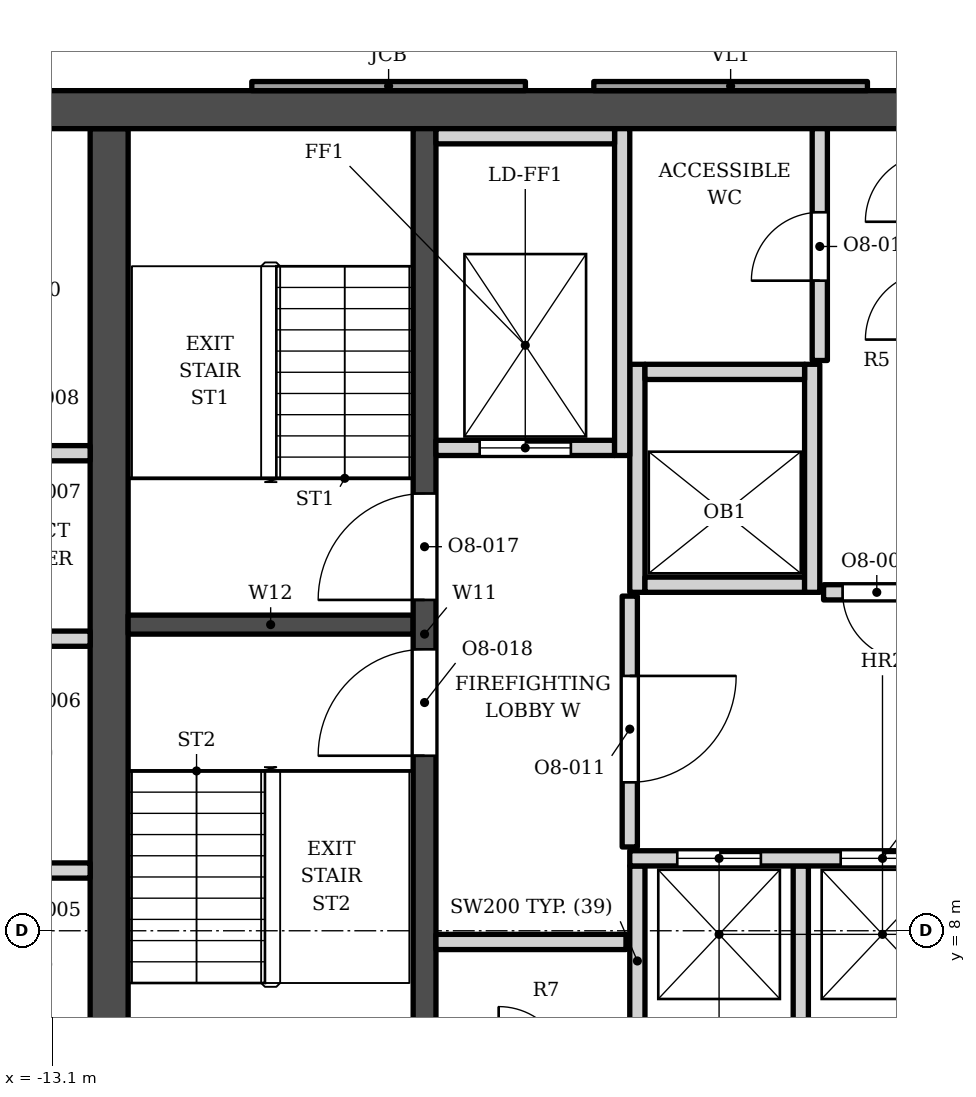
"""IFC4 building model, lengths in metres.
Left out: names, types, materials, properties, quantities, classifications, styles, units other than length and angle.
Written with IfcOpenShell. Run it as: python <this file> out.ifc"""

import sys

from ifc_helpers import new_model, si_unit, direction, frame, frame_2d, origin, place, context, subcontext, project, spatial, polyline, rectangle, outline, extrude, element, fill, save


model = new_model("IFC4")
c1 = context("Model", 3, precision=1e-05, world=origin(), true_north=direction((0.0, 1.0)))
c2 = subcontext(c1, "Body", "Model", "MODEL_VIEW")
j1 = project(units=[si_unit("LENGTHUNIT", "METRE"), si_unit("PLANEANGLEUNIT", "RADIAN")], contexts=[c1])
p1 = place(None, origin())
s1 = spatial("IfcSite", under=j1, at=p1, CompositionType="ELEMENT")
p2 = place(p1, origin())
s2 = spatial("IfcBuilding", under=s1, at=p2, CompositionType="ELEMENT")
p3 = place(p2, frame((0.0, 0.0, 231.5)))
s3 = spatial("IfcBuildingStorey", under=s2, at=p3, CompositionType="ELEMENT", Elevation=231.5)
p4 = place(p3, frame((-13.9, 18.802, 0.0), z_axis=(0.0, 0.0, 1.0), x_axis=(1.0, 0.0, 0.0)))
e1 = element("IfcWall", 1, at=p4, inside=s3, PredefinedType="SHEAR", context=c2, shape_type="SweptSolid", body=[
    extrude(rectangle(XDim=27.8, YDim=0.5, at=frame_2d((13.9, 0.0))), origin(), (0.0, 0.0, 1.0), 3.9),
])
p5 = place(p3, frame((-12.35, 5.253, 0.0), z_axis=(0.0, 0.0, 1.0), x_axis=(0.0, 1.0, 0.0)))
e2 = element("IfcWall", 2, at=p5, inside=s3, PredefinedType="SHEAR", context=c2, shape_type="SweptSolid", body=[
    extrude(rectangle(XDim=13.3, YDim=0.5, at=frame_2d((6.65, 0.0))), origin(), (0.0, 0.0, 1.0), 3.9),
])
p6 = place(p3, frame((-8.2, 5.253, 0.0), z_axis=(0.0, 0.0, 1.0), x_axis=(0.0, 1.0, 0.0)))
e3 = element("IfcWall", 3, at=p6, inside=s3, PredefinedType="SHEAR", context=c2, shape_type="SweptSolid", body=[
    extrude(rectangle(XDim=13.3, YDim=0.3, at=frame_2d((6.65, 0.0))), origin(), (0.0, 0.0, 1.0), 3.9),
])
p7 = place(p6, frame((7.1, 0.0, 0.0)))
e4 = element("IfcOpeningElement", 4, at=p7, cuts=e3, PredefinedType="OPENING", context=c2, shape_type="SweptSolid", body=[
    extrude(rectangle(XDim=1.4, YDim=2.1, at=frame_2d((0.7, 1.05))), frame((0.0, 0.16, 0.0), z_axis=(0.0, -1.0, 0.0), x_axis=(1.0, 0.0, 0.0)), (0.0, 0.0, 1.0), 0.32),
])
p8 = place(p6, frame((5.05, 0.0, 0.0)))
e5 = element("IfcOpeningElement", 5, at=p8, cuts=e3, PredefinedType="OPENING", context=c2, shape_type="SweptSolid", body=[
    extrude(rectangle(XDim=1.4, YDim=2.1, at=frame_2d((0.7, 1.05))), frame((0.0, 0.16, 0.0), z_axis=(0.0, -1.0, 0.0), x_axis=(1.0, 0.0, 0.0)), (0.0, 0.0, 1.0), 0.32),
])
p9 = place(p3, frame((-12.1, 12.028, 0.0), z_axis=(0.0, 0.0, 1.0), x_axis=(1.0, 0.0, 0.0)))
e6 = element("IfcWall", 6, at=p9, inside=s3, PredefinedType="SHEAR", context=c2, shape_type="SweptSolid", body=[
    extrude(rectangle(XDim=3.75, YDim=0.25, at=frame_2d((1.875, 0.0))), origin(), (0.0, 0.0, 1.0), 3.9),
])
p10 = place(p3, origin())
e7 = element("IfcWall", 7, at=p10, inside=s3, PredefinedType="ELEMENTEDWALL", context=c2, shape_type="SweptSolid", body=[
    extrude(outline(polyline([(-5.973, 19.173), (-5.973, 19.052), (-2.373, 19.052), (-2.373, 19.173), (-5.973, 19.173)])), origin(), (0.0, 0.0, 1.0), 3.0),
])
p11 = place(p3, origin())
e8 = element("IfcWall", 8, at=p11, inside=s3, PredefinedType="SOLIDWALL", context=c2, shape_type="SweptSolid", body=[
    extrude(outline(polyline([(-10.473, 19.173), (-10.473, 19.052), (-6.873, 19.052), (-6.873, 19.173), (-10.473, 19.173)])), origin(), (0.0, 0.0, 1.0), 3.0),
])
for number, where, z_axis, x_axis in (
    (9, (-5.4, 6.353, 0.0), (0.0, 0.0, 1.0), (0.0, 1.0, 0.0)),
    (10, (-3.25, 6.353, 0.0), (0.0, 0.0, 1.0), (0.0, 1.0, 0.0)),
    (11, (-8.05, 7.853, 0.0), (0.0, 0.0, 1.0), (1.0, 0.0, 0.0)),
):
    element("IfcWall", number, at=place(p3, frame(where, z_axis=z_axis, x_axis=x_axis)), inside=s3, PredefinedType="SOLIDWALL", context=c2, shape_type="SweptSolid", body=[
        extrude(rectangle(XDim=2.5, YDim=0.2, at=frame_2d((1.25, 0.0))), origin(), (0.0, 0.0, 1.0), 3.73),
    ])
p12 = place(p3, frame((-13.9, 8.792, 0.0), z_axis=(0.0, 0.0, 1.0), x_axis=(1.0, 0.0, 0.0)))
e12 = element("IfcWall", 12, at=p12, inside=s3, PredefinedType="SOLIDWALL", context=c2, shape_type="SweptSolid", body=[
    extrude(rectangle(XDim=1.3, YDim=0.2, at=frame_2d((0.65, 0.0))), origin(), (0.0, 0.0, 1.0), 3.73),
])
p13 = place(p3, frame((-5.5, 8.953, 0.0), z_axis=(0.0, 0.0, 1.0), x_axis=(1.0, 0.0, 0.0)))
e13 = element("IfcWall", 13, at=p13, inside=s3, PredefinedType="SOLIDWALL", context=c2, shape_type="SweptSolid", body=[
    extrude(rectangle(XDim=4.5, YDim=0.2, at=frame_2d((2.25, 0.0))), origin(), (0.0, 0.0, 1.0), 3.73),
])
p14 = place(p13, frame((0.625, 0.0, 0.0)))
e14 = element("IfcOpeningElement", 14, at=p14, cuts=e13, PredefinedType="OPENING", context=c2, shape_type="SweptSolid", body=[
    extrude(rectangle(XDim=1.1, YDim=2.1, at=frame_2d((0.55, 1.05))), frame((0.0, 0.11, 0.0), z_axis=(0.0, -1.0, 0.0), x_axis=(1.0, 0.0, 0.0)), (0.0, 0.0, 1.0), 0.22),
])
p15 = place(p13, frame((2.775, 0.0, 0.0)))
e15 = element("IfcOpeningElement", 15, at=p15, cuts=e13, PredefinedType="OPENING", context=c2, shape_type="SweptSolid", body=[
    extrude(rectangle(XDim=1.1, YDim=2.1, at=frame_2d((0.55, 1.05))), frame((0.0, 0.11, 0.0), z_axis=(0.0, -1.0, 0.0), x_axis=(1.0, 0.0, 0.0)), (0.0, 0.0, 1.0), 0.22),
])
p16 = place(p3, frame((-5.5, 9.103, 0.0), z_axis=(0.0, 0.0, 1.0), x_axis=(0.0, 1.0, 0.0)))
e16 = element("IfcWall", 16, at=p16, inside=s3, PredefinedType="SOLIDWALL", context=c2, shape_type="SweptSolid", body=[
    extrude(rectangle(XDim=3.3, YDim=0.2, at=frame_2d((1.65, 0.0))), origin(), (0.0, 0.0, 1.0), 3.73),
])
p17 = place(p16, frame((0.85, 0.0, 0.0)))
e17 = element("IfcOpeningElement", 17, at=p17, cuts=e16, PredefinedType="OPENING", context=c2, shape_type="SweptSolid", body=[
    extrude(rectangle(XDim=1.4, YDim=2.1, at=frame_2d((0.7, 1.05))), frame((0.0, 0.11, 0.0), z_axis=(0.0, -1.0, 0.0), x_axis=(1.0, 0.0, 0.0)), (0.0, 0.0, 1.0), 0.22),
])
p18 = place(p3, frame((-13.9, 11.843, 0.0), z_axis=(0.0, 0.0, 1.0), x_axis=(1.0, 0.0, 0.0)))
e18 = element("IfcWall", 18, at=p18, inside=s3, PredefinedType="SOLIDWALL", context=c2, shape_type="SweptSolid", body=[
    extrude(rectangle(XDim=1.3, YDim=0.2, at=frame_2d((0.65, 0.0))), origin(), (0.0, 0.0, 1.0), 3.73),
])
p19 = place(p3, frame((-2.95, 12.453, 0.0), z_axis=(0.0, 0.0, 1.0), x_axis=(1.0, 0.0, 0.0)))
e19 = element("IfcWall", 19, at=p19, inside=s3, PredefinedType="SOLIDWALL", context=c2, shape_type="SweptSolid", body=[
    extrude(rectangle(XDim=1.4, YDim=0.2, at=frame_2d((0.7, 0.0))), origin(), (0.0, 0.0, 1.0), 3.73),
])
p20 = place(p19, frame((0.25, 0.0, 0.0)))
e20 = element("IfcOpeningElement", 20, at=p20, cuts=e19, PredefinedType="OPENING", context=c2, shape_type="SweptSolid", body=[
    extrude(rectangle(XDim=0.9, YDim=2.1, at=frame_2d((0.45, 1.05))), frame((0.0, 0.11, 0.0), z_axis=(0.0, -1.0, 0.0), x_axis=(1.0, 0.0, 0.0)), (0.0, 0.0, 1.0), 0.22),
])
p21 = place(p3, frame((-5.4, 12.453, 0.0), z_axis=(0.0, 0.0, 1.0), x_axis=(0.0, 1.0, 0.0)))
e21 = element("IfcWall", 21, at=p21, inside=s3, PredefinedType="SOLIDWALL", context=c2, shape_type="SweptSolid", body=[
    extrude(rectangle(XDim=3.0, YDim=0.2, at=frame_2d((1.5, 0.0))), origin(), (0.0, 0.0, 1.0), 3.73),
])
p22 = place(p3, frame((-5.3, 12.552, 0.0), z_axis=(0.0, 0.0, 1.0), x_axis=(1.0, 0.0, 0.0)))
e22 = element("IfcWall", 22, at=p22, inside=s3, PredefinedType="SOLIDWALL", context=c2, shape_type="SweptSolid", body=[
    extrude(rectangle(XDim=2.1, YDim=0.2, at=frame_2d((1.05, 0.0))), origin(), (0.0, 0.0, 1.0), 3.73),
])
p23 = place(p3, frame((-3.1, 12.453, 0.0), z_axis=(0.0, 0.0, 1.0), x_axis=(0.0, 1.0, 0.0)))
e23 = element("IfcWall", 23, at=p23, inside=s3, PredefinedType="SOLIDWALL", context=c2, shape_type="SweptSolid", body=[
    extrude(rectangle(XDim=3.0, YDim=0.2, at=frame_2d((1.5, 0.0))), origin(), (0.0, 0.0, 1.0), 3.73),
])
p24 = place(p3, frame((-13.9, 14.283, 0.0), z_axis=(0.0, 0.0, 1.0), x_axis=(1.0, 0.0, 0.0)))
e24 = element("IfcWall", 24, at=p24, inside=s3, PredefinedType="SOLIDWALL", context=c2, shape_type="SweptSolid", body=[
    extrude(rectangle(XDim=1.3, YDim=0.2, at=frame_2d((0.65, 0.0))), origin(), (0.0, 0.0, 1.0), 3.73),
])
p25 = place(p3, frame((-8.05, 14.353, 0.0), z_axis=(0.0, 0.0, 1.0), x_axis=(1.0, 0.0, 0.0)))
e25 = element("IfcWall", 25, at=p25, inside=s3, PredefinedType="SOLIDWALL", context=c2, shape_type="SweptSolid", body=[
    extrude(rectangle(XDim=2.35, YDim=0.2, at=frame_2d((1.175, 0.0))), origin(), (0.0, 0.0, 1.0), 3.73),
])
p26 = place(p25, frame((0.575, 0.0, 0.0)))
e26 = element("IfcOpeningElement", 26, at=p26, cuts=e25, PredefinedType="OPENING", context=c2, shape_type="SweptSolid", body=[
    extrude(rectangle(XDim=1.2, YDim=2.1, at=frame_2d((0.6, 1.05))), frame((0.0, 0.11, 0.0), z_axis=(0.0, -1.0, 0.0), x_axis=(1.0, 0.0, 0.0)), (0.0, 0.0, 1.0), 0.22),
])
p27 = place(p3, frame((-5.6, 14.253, 0.0), z_axis=(0.0, 0.0, 1.0), x_axis=(0.0, 1.0, 0.0)))
e27 = element("IfcWall", 27, at=p27, inside=s3, PredefinedType="SOLIDWALL", context=c2, shape_type="SweptSolid", body=[
    extrude(rectangle(XDim=4.3, YDim=0.2, at=frame_2d((2.15, 0.0))), origin(), (0.0, 0.0, 1.0), 3.73),
])
p28 = place(p3, frame((-5.3, 15.353, 0.0), z_axis=(0.0, 0.0, 1.0), x_axis=(1.0, 0.0, 0.0)))
e28 = element("IfcWall", 28, at=p28, inside=s3, PredefinedType="SOLIDWALL", context=c2, shape_type="SweptSolid", body=[
    extrude(rectangle(XDim=2.1, YDim=0.2, at=frame_2d((1.05, 0.0))), origin(), (0.0, 0.0, 1.0), 3.73),
])
p29 = place(p3, frame((-3.0, 15.503, 0.0), z_axis=(0.0, 0.0, 1.0), x_axis=(0.0, 1.0, 0.0)))
e29 = element("IfcWall", 29, at=p29, inside=s3, PredefinedType="SOLIDWALL", context=c2, shape_type="SweptSolid", body=[
    extrude(rectangle(XDim=3.05, YDim=0.2, at=frame_2d((1.525, 0.0))), origin(), (0.0, 0.0, 1.0), 3.73),
])
p30 = place(p29, frame((1.05, 0.0, 0.0)))
e30 = element("IfcOpeningElement", 30, at=p30, cuts=e29, PredefinedType="OPENING", context=c2, shape_type="SweptSolid", body=[
    extrude(rectangle(XDim=0.9, YDim=2.1, at=frame_2d((0.45, 1.05))), frame((0.0, 0.11, 0.0), z_axis=(0.0, -1.0, 0.0), x_axis=(1.0, 0.0, 0.0)), (0.0, 0.0, 1.0), 0.22),
])
p31 = place(p3, frame((-8.05, 18.453, 0.0), z_axis=(0.0, 0.0, 1.0), x_axis=(1.0, 0.0, 0.0)))
e31 = element("IfcWall", 31, at=p31, inside=s3, PredefinedType="SOLIDWALL", context=c2, shape_type="SweptSolid", body=[
    extrude(rectangle(XDim=2.35, YDim=0.2, at=frame_2d((1.175, 0.0))), origin(), (0.0, 0.0, 1.0), 3.73),
])
p32 = place(p14, origin())
e32 = element("IfcDoor", 32, at=p32, inside=s3, OperationType="DOUBLE_DOOR_SLIDING", PredefinedType="DOOR", context=c2, shape_type="SweptSolid", body=[
    extrude(rectangle(XDim=1.1, YDim=2.1, at=frame_2d((0.55, 1.05))), frame((0.0, 0.025, 0.0), z_axis=(0.0, -1.0, 0.0), x_axis=(1.0, 0.0, 0.0)), (0.0, 0.0, 1.0), 0.05),
])
fill(e14, e32)
p33 = place(p15, origin())
e33 = element("IfcDoor", 33, at=p33, inside=s3, OperationType="DOUBLE_DOOR_SLIDING", PredefinedType="DOOR", context=c2, shape_type="SweptSolid", body=[
    extrude(rectangle(XDim=1.1, YDim=2.1, at=frame_2d((0.55, 1.05))), frame((0.0, 0.025, 0.0), z_axis=(0.0, -1.0, 0.0), x_axis=(1.0, 0.0, 0.0)), (0.0, 0.0, 1.0), 0.05),
])
fill(e15, e33)
p34 = place(p26, origin())
e34 = element("IfcDoor", 34, at=p34, inside=s3, OperationType="DOUBLE_DOOR_SLIDING", PredefinedType="DOOR", context=c2, shape_type="SweptSolid", body=[
    extrude(rectangle(XDim=1.2, YDim=2.1, at=frame_2d((0.6, 1.05))), frame((0.0, 0.025, 0.0), z_axis=(0.0, -1.0, 0.0), x_axis=(1.0, 0.0, 0.0)), (0.0, 0.0, 1.0), 0.05),
])
fill(e26, e34)
p35 = place(p7, origin())
e35 = element("IfcDoor", 35, at=p35, inside=s3, OperationType="SINGLE_SWING_LEFT", PredefinedType="DOOR", context=c2, shape_type="SweptSolid", body=[
    extrude(rectangle(XDim=1.4, YDim=2.1, at=frame_2d((0.7, 1.05))), frame((0.0, 0.025, 0.0), z_axis=(0.0, -1.0, 0.0), x_axis=(1.0, 0.0, 0.0)), (0.0, 0.0, 1.0), 0.05),
])
fill(e4, e35)
p36 = place(p8, origin())
e36 = element("IfcDoor", 36, at=p36, inside=s3, OperationType="SINGLE_SWING_LEFT", PredefinedType="DOOR", context=c2, shape_type="SweptSolid", body=[
    extrude(rectangle(XDim=1.4, YDim=2.1, at=frame_2d((0.7, 1.05))), frame((0.0, 0.025, 0.0), z_axis=(0.0, -1.0, 0.0), x_axis=(1.0, 0.0, 0.0)), (0.0, 0.0, 1.0), 0.05),
])
fill(e5, e36)
p37 = place(p20, origin())
e37 = element("IfcDoor", 37, at=p37, inside=s3, OperationType="SINGLE_SWING_RIGHT", PredefinedType="DOOR", context=c2, shape_type="SweptSolid", body=[
    extrude(rectangle(XDim=0.9, YDim=2.1, at=frame_2d((0.45, 1.05))), frame((0.0, 0.025, 0.0), z_axis=(0.0, -1.0, 0.0), x_axis=(1.0, 0.0, 0.0)), (0.0, 0.0, 1.0), 0.05),
])
fill(e20, e37)
p38 = place(p17, origin())
e38 = element("IfcDoor", 38, at=p38, inside=s3, OperationType="SINGLE_SWING_RIGHT", PredefinedType="DOOR", context=c2, shape_type="SweptSolid", body=[
    extrude(rectangle(XDim=1.4, YDim=2.1, at=frame_2d((0.7, 1.05))), frame((0.0, 0.025, 0.0), z_axis=(0.0, -1.0, 0.0), x_axis=(1.0, 0.0, 0.0)), (0.0, 0.0, 1.0), 0.05),
])
fill(e17, e38)
p39 = place(p30, origin())
e39 = element("IfcDoor", 39, at=p39, inside=s3, OperationType="SINGLE_SWING_LEFT", PredefinedType="DOOR", context=c2, shape_type="SweptSolid", body=[
    extrude(rectangle(XDim=0.9, YDim=2.1, at=frame_2d((0.45, 1.05))), frame((0.0, 0.025, 0.0), z_axis=(0.0, -1.0, 0.0), x_axis=(1.0, 0.0, 0.0)), (0.0, 0.0, 1.0), 0.05),
])
fill(e30, e39)
save(model, sys.argv[1])
